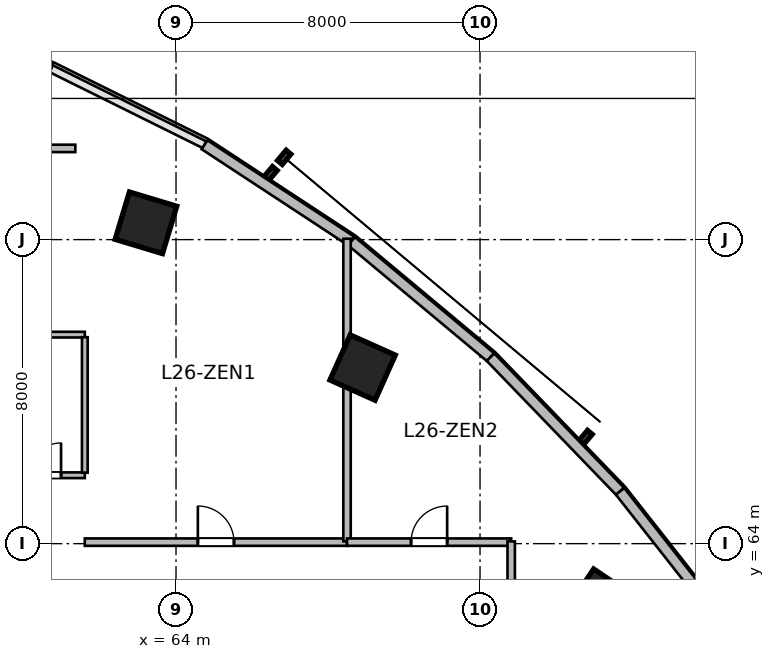
"""IFC4 building model, lengths in metres.
Left out: names, types, materials, properties, quantities, classifications, styles, units other than length and angle.
Written with IfcOpenShell. Run it as: python <this file> out.ifc"""

import sys

from ifc_helpers import new_model, si_unit, direction, frame, frame_2d, origin, origin_2d, place, context, subcontext, project, spatial, rectangle, extrude, source, transform, mapped, element, fill, save


model = new_model("IFC4")
c1 = context("Model", 3, precision=1e-05, world=origin(), true_north=direction((0.0, 1.0)))
c2 = subcontext(c1, "Body", "Model", "MODEL_VIEW")
j1 = project(units=[si_unit("LENGTHUNIT", "METRE"), si_unit("PLANEANGLEUNIT", "RADIAN")], contexts=[c1])
p1 = place(None, origin())
s1 = spatial("IfcSite", under=j1, at=p1, CompositionType="ELEMENT")
p2 = place(p1, origin())
s2 = spatial("IfcBuilding", under=s1, at=p2, CompositionType="ELEMENT")
p3 = place(p2, frame((0.0, 0.0, 111.6)))
s3 = spatial("IfcBuildingStorey", under=s2, at=p3, CompositionType="ELEMENT", Elevation=111.6)
m1 = source(origin(), c2, "Body", "SweptSolid", [
    extrude(rectangle(XDim=1.3, YDim=1.3, at=origin_2d()), origin(), (0.0, 0.0, 1.0), 3.9),
])
for number, where, z_axis, x_axis in (
    (1, (63.209, 72.442, 0.0), (0.0, 0.0, 1.0), (0.289, 0.957, 0.0)),
    (2, (68.91, 68.633, 0.0), (0.0, 0.0, 1.0), (0.409, 0.912, 0.0)),
    (3, (75.167, 62.43, 0.0), (0.0, 0.0, 1.0), (0.558, 0.83, 0.0)),
):
    element("IfcColumn", number, at=place(p3, frame(where, z_axis=z_axis, x_axis=x_axis)), inside=s3, PredefinedType="COLUMN", context=c2, shape_type="MappedRepresentation", body=[
        mapped(m1, transform((0.0, 0.0, 0.0), scale=1.0)),
    ])
m2 = source(origin(), c2, "Body", "SweptSolid", [
    extrude(rectangle(XDim=4.409, YDim=0.28, at=frame_2d((2.205, 0.0))), origin(), (0.0, 0.0, 1.0), 3.65),
])
p4 = place(p3, frame((56.548, 77.941, 0.0), z_axis=(0.0, 0.0, 1.0), x_axis=(0.944879374121, -0.327418643881, 0.0)))
e4 = element("IfcWall", 4, at=p4, inside=s3, PredefinedType="SOLIDWALL", context=c2, shape_type="MappedRepresentation", body=[
    mapped(m2, transform((0.0, 0.0, 0.0), scale=1.0)),
])
m3 = source(origin(), c2, "Body", "SweptSolid", [
    extrude(rectangle(XDim=4.626, YDim=0.28, at=frame_2d((2.313, 0.0))), origin(), (0.0, 0.0, 1.0), 3.65),
])
p5 = place(p3, frame((64.751, 74.496, 0.0), z_axis=(0.0, 0.0, 1.0), x_axis=(0.83595938331, -0.548791316855, 0.0)))
e5 = element("IfcWall", 5, at=p5, inside=s3, PredefinedType="SOLIDWALL", context=c2, shape_type="MappedRepresentation", body=[
    mapped(m3, transform((0.0, 0.0, 0.0), scale=1.0)),
])
m4 = source(origin(), c2, "Body", "SweptSolid", [
    extrude(rectangle(XDim=4.762, YDim=0.28, at=frame_2d((2.381, 0.0))), origin(), (0.0, 0.0, 1.0), 3.65),
])
p6 = place(p3, frame((68.618, 71.958, 0.0), z_axis=(0.0, 0.0, 1.0), x_axis=(0.767952279762, -0.640507061638, 0.0)))
e6 = element("IfcWall", 6, at=p6, inside=s3, PredefinedType="SOLIDWALL", context=c2, shape_type="MappedRepresentation", body=[
    mapped(m4, transform((0.0, 0.0, 0.0), scale=1.0)),
])
m5 = source(origin(), c2, "Body", "SweptSolid", [
    extrude(rectangle(XDim=4.908, YDim=0.28, at=frame_2d((2.454, 0.0))), origin(), (0.0, 0.0, 1.0), 3.65),
])
p7 = place(p3, frame((72.275, 68.907, 0.0), z_axis=(0.0, 0.0, 1.0), x_axis=(0.694613154328, -0.719383462302, 0.0)))
e7 = element("IfcWall", 7, at=p7, inside=s3, PredefinedType="SOLIDWALL", context=c2, shape_type="MappedRepresentation", body=[
    mapped(m5, transform((0.0, 0.0, 0.0), scale=1.0)),
])
m6 = source(origin(), c2, "Body", "SweptSolid", [
    extrude(rectangle(XDim=5.058, YDim=0.28, at=frame_2d((2.529, 0.0))), origin(), (0.0, 0.0, 1.0), 3.65),
])
p8 = place(p3, frame((75.685, 65.376, 0.0), z_axis=(0.0, 0.0, 1.0), x_axis=(0.618145507434, -0.786063694391, 0.0)))
e8 = element("IfcWall", 8, at=p8, inside=s3, PredefinedType="SOLIDWALL", context=c2, shape_type="MappedRepresentation", body=[
    mapped(m6, transform((0.0, 0.0, 0.0), scale=1.0)),
])
m7 = source(origin(), c2, "Body", "SweptSolid", [
    extrude(rectangle(XDim=2.1, YDim=0.15, at=frame_2d((1.05, 0.0))), origin(), (0.0, 0.0, 1.0), 3.65),
])
p9 = place(p3, frame((59.5, 65.8, 0.0), z_axis=(0.0, 0.0, 1.0), x_axis=(1.0, 0.0, 0.0)))
e9 = element("IfcWall", 9, at=p9, inside=s3, PredefinedType="PARTITIONING", context=c2, shape_type="MappedRepresentation", body=[
    mapped(m7, transform((0.0, 0.0, 0.0), scale=1.0)),
])
p10 = place(p9, frame((0.625, 0.0, 0.0)))
e10 = element("IfcOpeningElement", 10, at=p10, cuts=e9, PredefinedType="OPENING", context=c2, shape_type="SweptSolid", body=[
    extrude(rectangle(XDim=0.85, YDim=2.1, at=frame_2d((0.425, 1.05))), frame((0.0, 0.085, 0.0), z_axis=(0.0, -1.0, 0.0), x_axis=(1.0, 0.0, 0.0)), (0.0, 0.0, 1.0), 0.17),
])
p11 = place(p3, frame((59.5, 69.5, 0.0), z_axis=(0.0, 0.0, 1.0), x_axis=(1.0, 0.0, 0.0)))
e11 = element("IfcWall", 11, at=p11, inside=s3, PredefinedType="PARTITIONING", context=c2, shape_type="MappedRepresentation", body=[
    mapped(m7, transform((0.0, 0.0, 0.0), scale=1.0)),
])
m8 = source(origin(), c2, "Body", "SweptSolid", [
    extrude(rectangle(XDim=3.565, YDim=0.15, at=frame_2d((1.783, 0.0))), origin(), (0.0, 0.0, 1.0), 3.65),
])
p12 = place(p3, frame((61.6, 65.867, 0.0), z_axis=(0.0, 0.0, 1.0), x_axis=(0.0, 1.0, 0.0)))
e12 = element("IfcWall", 12, at=p12, inside=s3, PredefinedType="PARTITIONING", context=c2, shape_type="MappedRepresentation", body=[
    mapped(m8, transform((0.0, 0.0, 0.0), scale=1.0)),
])
m9 = source(origin(), c2, "Body", "SweptSolid", [
    extrude(rectangle(XDim=13.2, YDim=0.195, at=frame_2d((6.6, 0.0))), origin(), (0.0, 0.0, 1.0), 3.022),
])
p13 = place(p3, frame((48.15, 74.4, 0.0), z_axis=(0.0, 0.0, 1.0), x_axis=(1.0, 0.0, 0.0)))
e13 = element("IfcWall", 13, at=p13, inside=s3, PredefinedType="PARTITIONING", context=c2, shape_type="MappedRepresentation", body=[
    mapped(m9, transform((0.0, 0.0, 0.0), scale=1.0)),
])
p14 = place(p13, frame((5.6, 0.0, 0.0)))
e14 = element("IfcOpeningElement", 14, at=p14, cuts=e13, PredefinedType="OPENING", context=c2, shape_type="SweptSolid", body=[
    extrude(rectangle(XDim=1.1, YDim=2.15, at=frame_2d((0.55, 1.075))), frame((0.0, 0.107, 0.0), z_axis=(0.0, -1.0, 0.0), x_axis=(1.0, 0.0, 0.0)), (0.0, 0.0, 1.0), 0.215),
])
m10 = source(origin(), c2, "Body", "SweptSolid", [
    extrude(rectangle(XDim=6.9, YDim=0.195, at=frame_2d((3.45, 0.0))), origin(), (0.0, 0.0, 1.0), 3.65),
])
p15 = place(p3, frame((61.6, 64.04, 0.0), z_axis=(0.0, 0.0, 1.0), x_axis=(1.0, 0.0, 0.0)))
e15 = element("IfcWall", 15, at=p15, inside=s3, PredefinedType="PARTITIONING", context=c2, shape_type="MappedRepresentation", body=[
    mapped(m10, transform((0.0, 0.0, 0.0), scale=1.0)),
])
p16 = place(p15, frame((2.975, 0.0, 0.0)))
e16 = element("IfcOpeningElement", 16, at=p16, cuts=e15, PredefinedType="OPENING", context=c2, shape_type="SweptSolid", body=[
    extrude(rectangle(XDim=0.95, YDim=2.1, at=frame_2d((0.475, 1.05))), frame((0.0, 0.107, 0.0), z_axis=(0.0, -1.0, 0.0), x_axis=(1.0, 0.0, 0.0)), (0.0, 0.0, 1.0), 0.215),
])
m11 = source(origin(), c2, "Body", "SweptSolid", [
    extrude(rectangle(XDim=7.963, YDim=0.195, at=frame_2d((3.982, 0.0))), origin(), (0.0, 0.0, 1.0), 2.942),
])
p17 = place(p3, frame((68.5, 64.06, 0.0), z_axis=(0.0, 0.0, 1.0), x_axis=(0.0, 1.0, 0.0)))
e17 = element("IfcWall", 17, at=p17, inside=s3, PredefinedType="PARTITIONING", context=c2, shape_type="MappedRepresentation", body=[
    mapped(m11, transform((0.0, 0.0, 0.0), scale=1.0)),
])
m12 = source(origin(), c2, "Body", "SweptSolid", [
    extrude(rectangle(XDim=4.32, YDim=0.195, at=frame_2d((2.16, 0.0))), origin(), (0.0, 0.0, 1.0), 3.65),
])
p18 = place(p3, frame((68.5, 64.04, 0.0), z_axis=(0.0, 0.0, 1.0), x_axis=(1.0, 0.0, 0.0)))
e18 = element("IfcWall", 18, at=p18, inside=s3, PredefinedType="PARTITIONING", context=c2, shape_type="MappedRepresentation", body=[
    mapped(m12, transform((0.0, 0.0, 0.0), scale=1.0)),
])
p19 = place(p18, frame((1.685, 0.0, 0.0)))
e19 = element("IfcOpeningElement", 19, at=p19, cuts=e18, PredefinedType="OPENING", context=c2, shape_type="SweptSolid", body=[
    extrude(rectangle(XDim=0.95, YDim=2.1, at=frame_2d((0.475, 1.05))), frame((0.0, 0.107, 0.0), z_axis=(0.0, -1.0, 0.0), x_axis=(1.0, 0.0, 0.0)), (0.0, 0.0, 1.0), 0.215),
])
m13 = source(origin(), c2, "Body", "SweptSolid", [
    extrude(rectangle(XDim=2.62, YDim=0.195, at=frame_2d((1.31, 0.0))), origin(), (0.0, 0.0, 1.0), 3.324),
])
p20 = place(p3, frame((72.82, 61.44, 0.0), z_axis=(0.0, 0.0, 1.0), x_axis=(0.0, 1.0, 0.0)))
e20 = element("IfcWall", 20, at=p20, inside=s3, PredefinedType="PARTITIONING", context=c2, shape_type="MappedRepresentation", body=[
    mapped(m13, transform((0.0, 0.0, 0.0), scale=1.0)),
])
m14 = source(origin(), c2, "Body", "SweptSolid", [
    extrude(rectangle(XDim=0.85, YDim=2.1, at=frame_2d((0.425, 1.05))), frame((0.0, 0.025, 0.0), z_axis=(0.0, -1.0, 0.0), x_axis=(1.0, 0.0, 0.0)), (0.0, 0.0, 1.0), 0.05),
])
p21 = place(p10, origin())
e21 = element("IfcDoor", 21, at=p21, inside=s3, OperationType="SINGLE_SWING_RIGHT", PredefinedType="DOOR", context=c2, shape_type="MappedRepresentation", body=[
    mapped(m14, transform((0.0, 0.0, 0.0), scale=1.0)),
])
fill(e10, e21)
m15 = source(origin(), c2, "Body", "SweptSolid", [
    extrude(rectangle(XDim=0.95, YDim=2.1, at=frame_2d((0.475, 1.05))), frame((0.0, 0.025, 0.0), z_axis=(0.0, -1.0, 0.0), x_axis=(1.0, 0.0, 0.0)), (0.0, 0.0, 1.0), 0.05),
])
p22 = place(p16, origin())
e22 = element("IfcDoor", 22, at=p22, inside=s3, OperationType="SINGLE_SWING_LEFT", PredefinedType="DOOR", context=c2, shape_type="MappedRepresentation", body=[
    mapped(m15, transform((0.0, 0.0, 0.0), scale=1.0)),
])
fill(e16, e22)
p23 = place(p19, origin())
e23 = element("IfcDoor", 23, at=p23, inside=s3, OperationType="SINGLE_SWING_RIGHT", PredefinedType="DOOR", context=c2, shape_type="MappedRepresentation", body=[
    mapped(m15, transform((0.0, 0.0, 0.0), scale=1.0)),
])
fill(e19, e23)
save(model, sys.argv[1])
